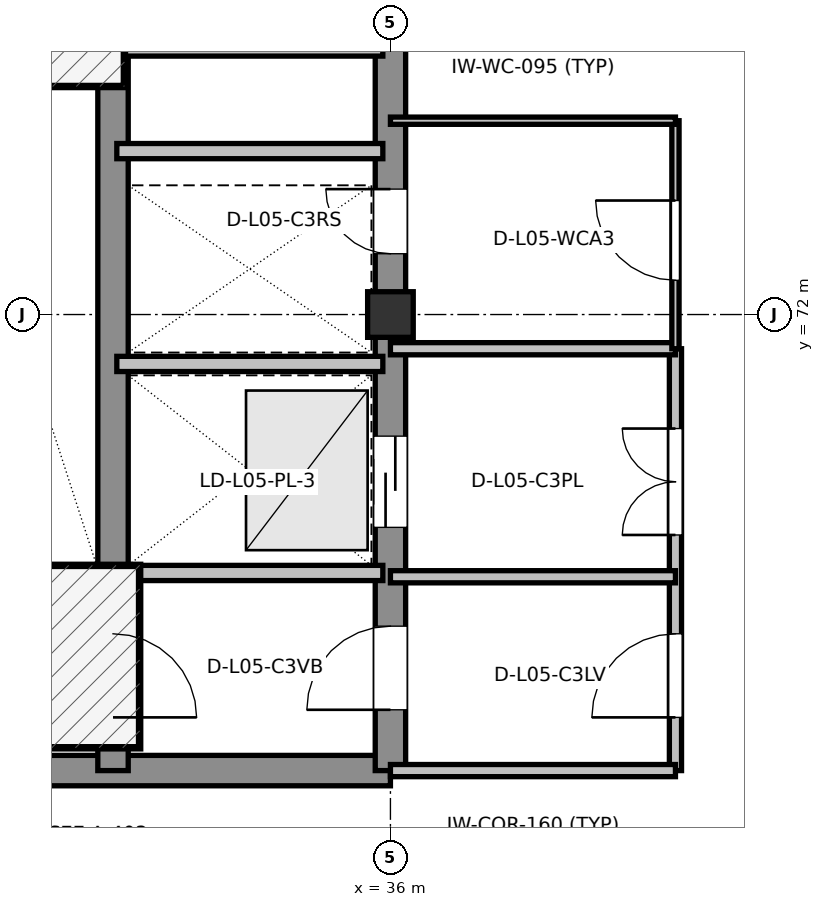
"""IFC4 building model, lengths in metres.
Left out: names, types, materials, properties, quantities, classifications, styles, units other than length and angle.
Written with IfcOpenShell. Run it as: python <this file> out.ifc"""

import sys

from ifc_helpers import new_model, si_unit, direction, frame, frame_2d, origin, origin_2d, place, context, subcontext, project, spatial, rectangle, extrude, element, fill, save


model = new_model("IFC4")
c1 = context("Model", 3, precision=1e-05, world=origin(), true_north=direction((0.0, 1.0)))
c2 = subcontext(c1, "Body", "Model", "MODEL_VIEW")
j1 = project(units=[si_unit("LENGTHUNIT", "METRE"), si_unit("PLANEANGLEUNIT", "RADIAN")], contexts=[c1])
p1 = place(None, origin())
s1 = spatial("IfcSite", under=j1, at=p1, CompositionType="ELEMENT")
p2 = place(p1, origin())
s2 = spatial("IfcBuilding", under=s1, at=p2, CompositionType="ELEMENT")
p3 = place(p2, frame((0.0, 0.0, 23.4)))
s3 = spatial("IfcBuildingStorey", under=s2, at=p3, CompositionType="ELEMENT", Elevation=23.4)
p4 = place(p3, frame((36.0, 72.0, 0.0), z_axis=(0.0, 0.0, 1.0), x_axis=(1.0, 0.0, 0.0)))
e1 = element("IfcColumn", 1, at=p4, inside=s3, PredefinedType="COLUMN", context=c2, shape_type="SweptSolid", body=[
    extrude(rectangle(XDim=0.6, YDim=0.6, at=origin_2d()), origin(), (0.0, 0.0, 1.0), 4.2),
])
p5 = place(p3, frame((27.0, 66.0, 0.0), z_axis=(0.0, 0.0, 1.0), x_axis=(1.0, 0.0, 0.0)))
e2 = element("IfcWall", 2, at=p5, inside=s3, PredefinedType="SHEAR", context=c2, shape_type="SweptSolid", body=[
    extrude(rectangle(XDim=9.0, YDim=0.4, at=frame_2d((4.5, 0.0))), origin(), (0.0, 0.0, 1.0), 3.96),
])
p6 = place(p3, frame((36.0, 66.0, 0.0), z_axis=(0.0, 0.0, 1.0), x_axis=(0.0, 1.0, 0.0)))
e3 = element("IfcWall", 3, at=p6, inside=s3, PredefinedType="SHEAR", context=c2, shape_type="SweptSolid", body=[
    extrude(rectangle(XDim=18.0, YDim=0.4, at=frame_2d((9.0, 0.0))), origin(), (0.0, 0.0, 1.0), 3.96),
])
p7 = place(p6, frame((0.8, 0.0, 0.0)))
e4 = element("IfcOpeningElement", 4, at=p7, cuts=e3, PredefinedType="OPENING", context=c2, shape_type="SweptSolid", body=[
    extrude(rectangle(XDim=1.1, YDim=2.16, at=frame_2d((0.55, 1.08))), frame((0.0, 0.21, 0.0), z_axis=(0.0, -1.0, 0.0), x_axis=(1.0, 0.0, 0.0)), (0.0, 0.0, 1.0), 0.42),
])
p8 = place(p6, frame((3.2, 0.0, 0.0)))
e5 = element("IfcOpeningElement", 5, at=p8, cuts=e3, PredefinedType="OPENING", context=c2, shape_type="SweptSolid", body=[
    extrude(rectangle(XDim=1.2, YDim=2.2, at=frame_2d((0.6, 1.1))), frame((0.0, 0.21, 0.0), z_axis=(0.0, -1.0, 0.0), x_axis=(1.0, 0.0, 0.0)), (0.0, 0.0, 1.0), 0.42),
])
p9 = place(p6, frame((6.8, 0.0, 0.0)))
e6 = element("IfcOpeningElement", 6, at=p9, cuts=e3, PredefinedType="OPENING", context=c2, shape_type="SweptSolid", body=[
    extrude(rectangle(XDim=0.85, YDim=2.1, at=frame_2d((0.425, 1.05))), frame((0.0, 0.21, 0.0), z_axis=(0.0, -1.0, 0.0), x_axis=(1.0, 0.0, 0.0)), (0.0, 0.0, 1.0), 0.42),
])
p10 = place(p3, frame((32.35, 66.0, 0.0), z_axis=(0.0, 0.0, 1.0), x_axis=(0.0, 1.0, 0.0)))
e7 = element("IfcWall", 7, at=p10, inside=s3, PredefinedType="SHEAR", context=c2, shape_type="SweptSolid", body=[
    extrude(rectangle(XDim=18.0, YDim=0.4, at=frame_2d((9.0, 0.0))), origin(), (0.0, 0.0, 1.0), 3.96),
])
p11 = place(p10, frame((0.7, 0.0, 0.0)))
e8 = element("IfcOpeningElement", 8, at=p11, cuts=e7, PredefinedType="OPENING", context=c2, shape_type="SweptSolid", body=[
    extrude(rectangle(XDim=1.1, YDim=2.16, at=frame_2d((0.55, 1.08))), frame((0.0, 0.21, 0.0), z_axis=(0.0, -1.0, 0.0), x_axis=(1.0, 0.0, 0.0)), (0.0, 0.0, 1.0), 0.42),
])
for number, where, z_axis, x_axis in (
    (9, (32.4, 68.6, 0.0), (0.0, 0.0, 1.0), (1.0, 0.0, 0.0)),
    (10, (32.4, 71.35, 0.0), (0.0, 0.0, 1.0), (1.0, 0.0, 0.0)),
    (11, (32.4, 74.15, 0.0), (0.0, 0.0, 1.0), (1.0, 0.0, 0.0)),
    (12, (32.4, 75.5, 0.0), (0.0, 0.0, 1.0), (1.0, 0.0, 0.0)),
):
    element("IfcWall", number, at=place(p3, frame(where, z_axis=z_axis, x_axis=x_axis)), inside=s3, PredefinedType="PARTITIONING", context=c2, shape_type="SweptSolid", body=[
        extrude(rectangle(XDim=3.5, YDim=0.2, at=frame_2d((1.75, 0.0))), origin(), (0.0, 0.0, 1.0), 3.96),
    ])
p12 = place(p3, frame((39.75, 66.0, 0.0), z_axis=(0.0, 0.0, 1.0), x_axis=(0.0, 1.0, 0.0)))
e13 = element("IfcWall", 13, at=p12, inside=s3, PredefinedType="PARTITIONING", context=c2, shape_type="SweptSolid", body=[
    extrude(rectangle(XDim=5.55, YDim=0.16, at=frame_2d((2.775, 0.0))), origin(), (0.0, 0.0, 1.0), 3.96),
])
p13 = place(p12, frame((0.7, 0.0, 0.0)))
e14 = element("IfcOpeningElement", 14, at=p13, cuts=e13, PredefinedType="OPENING", context=c2, shape_type="SweptSolid", body=[
    extrude(rectangle(XDim=1.1, YDim=2.16, at=frame_2d((0.55, 1.08))), frame((0.0, 0.09, 0.0), z_axis=(0.0, -1.0, 0.0), x_axis=(1.0, 0.0, 0.0)), (0.0, 0.0, 1.0), 0.18),
])
p14 = place(p12, frame((3.1, 0.0, 0.0)))
e15 = element("IfcOpeningElement", 15, at=p14, cuts=e13, PredefinedType="OPENING", context=c2, shape_type="SweptSolid", body=[
    extrude(rectangle(XDim=1.4, YDim=2.2, at=frame_2d((0.7, 1.1))), frame((0.0, 0.09, 0.0), z_axis=(0.0, -1.0, 0.0), x_axis=(1.0, 0.0, 0.0)), (0.0, 0.0, 1.0), 0.18),
])
for number, where, z_axis, x_axis in (
    (16, (36.0, 66.0, 0.0), (0.0, 0.0, 1.0), (1.0, 0.0, 0.0)),
    (17, (36.0, 68.55, 0.0), (0.0, 0.0, 1.0), (1.0, 0.0, 0.0)),
    (18, (36.0, 71.55, 0.0), (0.0, 0.0, 1.0), (1.0, 0.0, 0.0)),
):
    element("IfcWall", number, at=place(p3, frame(where, z_axis=z_axis, x_axis=x_axis)), inside=s3, PredefinedType="PARTITIONING", context=c2, shape_type="SweptSolid", body=[
        extrude(rectangle(XDim=3.75, YDim=0.16, at=frame_2d((1.875, 0.0))), origin(), (0.0, 0.0, 1.0), 3.96),
    ])
p15 = place(p3, frame((39.75, 71.55, 0.0), z_axis=(0.0, 0.0, 1.0), x_axis=(0.0, 1.0, 0.0)))
e19 = element("IfcWall", 19, at=p15, inside=s3, PredefinedType="PARTITIONING", context=c2, shape_type="SweptSolid", body=[
    extrude(rectangle(XDim=3.0, YDim=0.095, at=frame_2d((1.5, 0.0))), origin(), (0.0, 0.0, 1.0), 3.96),
])
p16 = place(p15, frame((0.9, 0.0, 0.0)))
e20 = element("IfcOpeningElement", 20, at=p16, cuts=e19, PredefinedType="OPENING", context=c2, shape_type="SweptSolid", body=[
    extrude(rectangle(XDim=1.05, YDim=2.13, at=frame_2d((0.525, 1.065))), frame((0.0, 0.057, 0.0), z_axis=(0.0, -1.0, 0.0), x_axis=(1.0, 0.0, 0.0)), (0.0, 0.0, 1.0), 0.115),
])
p17 = place(p3, frame((36.0, 74.55, 0.0), z_axis=(0.0, 0.0, 1.0), x_axis=(1.0, 0.0, 0.0)))
e21 = element("IfcWall", 21, at=p17, inside=s3, PredefinedType="PARTITIONING", context=c2, shape_type="SweptSolid", body=[
    extrude(rectangle(XDim=3.75, YDim=0.095, at=frame_2d((1.875, 0.0))), origin(), (0.0, 0.0, 1.0), 3.96),
])
p18 = place(p2, frame((0.0, 0.0, 40.2)))
p19 = place(p18, frame((0.0, 0.0, -12.84)))
p20 = place(p19, frame((31.5, 67.5, 0.0)))
p21 = place(p20, frame((0.0, 0.0, 0.19)))
e22 = element("IfcWindow", 22, at=p21, inside=s3, PartitioningType="SINGLE_PANEL", PredefinedType="SKYLIGHT", context=c2, shape_type="SweptSolid", body=[
    extrude(rectangle(XDim=2.4, YDim=2.4, at=origin_2d()), origin(), (0.0, 0.0, 1.0), 0.05),
])
p22 = place(p19, frame((31.5, 76.5, 0.0)))
p23 = place(p22, frame((0.0, 0.0, 0.19)))
e23 = element("IfcWindow", 23, at=p23, inside=s3, PartitioningType="SINGLE_PANEL", PredefinedType="SKYLIGHT", context=c2, shape_type="SweptSolid", body=[
    extrude(rectangle(XDim=2.0, YDim=3.0, at=origin_2d()), origin(), (0.0, 0.0, 1.0), 0.05),
])
p24 = place(p11, frame((1.1, 0.0, 0.0), z_axis=(0.0, 0.0, 1.0), x_axis=(-1.0, 0.0, 0.0)))
e24 = element("IfcDoor", 24, at=p24, inside=s3, OperationType="SINGLE_SWING_RIGHT", PredefinedType="DOOR", context=c2, shape_type="SweptSolid", body=[
    extrude(rectangle(XDim=1.1, YDim=2.16, at=frame_2d((0.55, 1.08))), frame((0.0, 0.025, 0.0), z_axis=(0.0, -1.0, 0.0), x_axis=(1.0, 0.0, 0.0)), (0.0, 0.0, 1.0), 0.05),
])
fill(e8, e24)
p25 = place(p7, origin())
e25 = element("IfcDoor", 25, at=p25, inside=s3, OperationType="SINGLE_SWING_LEFT", PredefinedType="DOOR", context=c2, shape_type="SweptSolid", body=[
    extrude(rectangle(XDim=1.1, YDim=2.16, at=frame_2d((0.55, 1.08))), frame((0.0, 0.025, 0.0), z_axis=(0.0, -1.0, 0.0), x_axis=(1.0, 0.0, 0.0)), (0.0, 0.0, 1.0), 0.05),
])
fill(e4, e25)
p26 = place(p8, origin())
e26 = element("IfcDoor", 26, at=p26, inside=s3, OperationType="SLIDING_TO_LEFT", PredefinedType="DOOR", context=c2, shape_type="SweptSolid", body=[
    extrude(rectangle(XDim=1.2, YDim=2.2, at=frame_2d((0.6, 1.1))), frame((0.0, 0.025, 0.0), z_axis=(0.0, -1.0, 0.0), x_axis=(1.0, 0.0, 0.0)), (0.0, 0.0, 1.0), 0.05),
])
fill(e5, e26)
p27 = place(p9, origin())
e27 = element("IfcDoor", 27, at=p27, inside=s3, OperationType="SINGLE_SWING_RIGHT", PredefinedType="DOOR", context=c2, shape_type="SweptSolid", body=[
    extrude(rectangle(XDim=0.85, YDim=2.1, at=frame_2d((0.425, 1.05))), frame((0.0, 0.025, 0.0), z_axis=(0.0, -1.0, 0.0), x_axis=(1.0, 0.0, 0.0)), (0.0, 0.0, 1.0), 0.05),
])
fill(e6, e27)
p28 = place(p13, origin())
e28 = element("IfcDoor", 28, at=p28, inside=s3, OperationType="SINGLE_SWING_LEFT", PredefinedType="DOOR", context=c2, shape_type="SweptSolid", body=[
    extrude(rectangle(XDim=1.1, YDim=2.16, at=frame_2d((0.55, 1.08))), frame((0.0, 0.025, 0.0), z_axis=(0.0, -1.0, 0.0), x_axis=(1.0, 0.0, 0.0)), (0.0, 0.0, 1.0), 0.05),
])
fill(e14, e28)
p29 = place(p14, origin())
e29 = element("IfcDoor", 29, at=p29, inside=s3, OperationType="DOUBLE_DOOR_SINGLE_SWING", PredefinedType="DOOR", context=c2, shape_type="SweptSolid", body=[
    extrude(rectangle(XDim=1.4, YDim=2.2, at=frame_2d((0.7, 1.1))), frame((0.0, 0.025, 0.0), z_axis=(0.0, -1.0, 0.0), x_axis=(1.0, 0.0, 0.0)), (0.0, 0.0, 1.0), 0.05),
])
fill(e15, e29)
p30 = place(p16, origin())
e30 = element("IfcDoor", 30, at=p30, inside=s3, OperationType="SINGLE_SWING_RIGHT", PredefinedType="DOOR", context=c2, shape_type="SweptSolid", body=[
    extrude(rectangle(XDim=1.05, YDim=2.13, at=frame_2d((0.525, 1.065))), frame((0.0, 0.025, 0.0), z_axis=(0.0, -1.0, 0.0), x_axis=(1.0, 0.0, 0.0)), (0.0, 0.0, 1.0), 0.05),
])
fill(e20, e30)
save(model, sys.argv[1])
